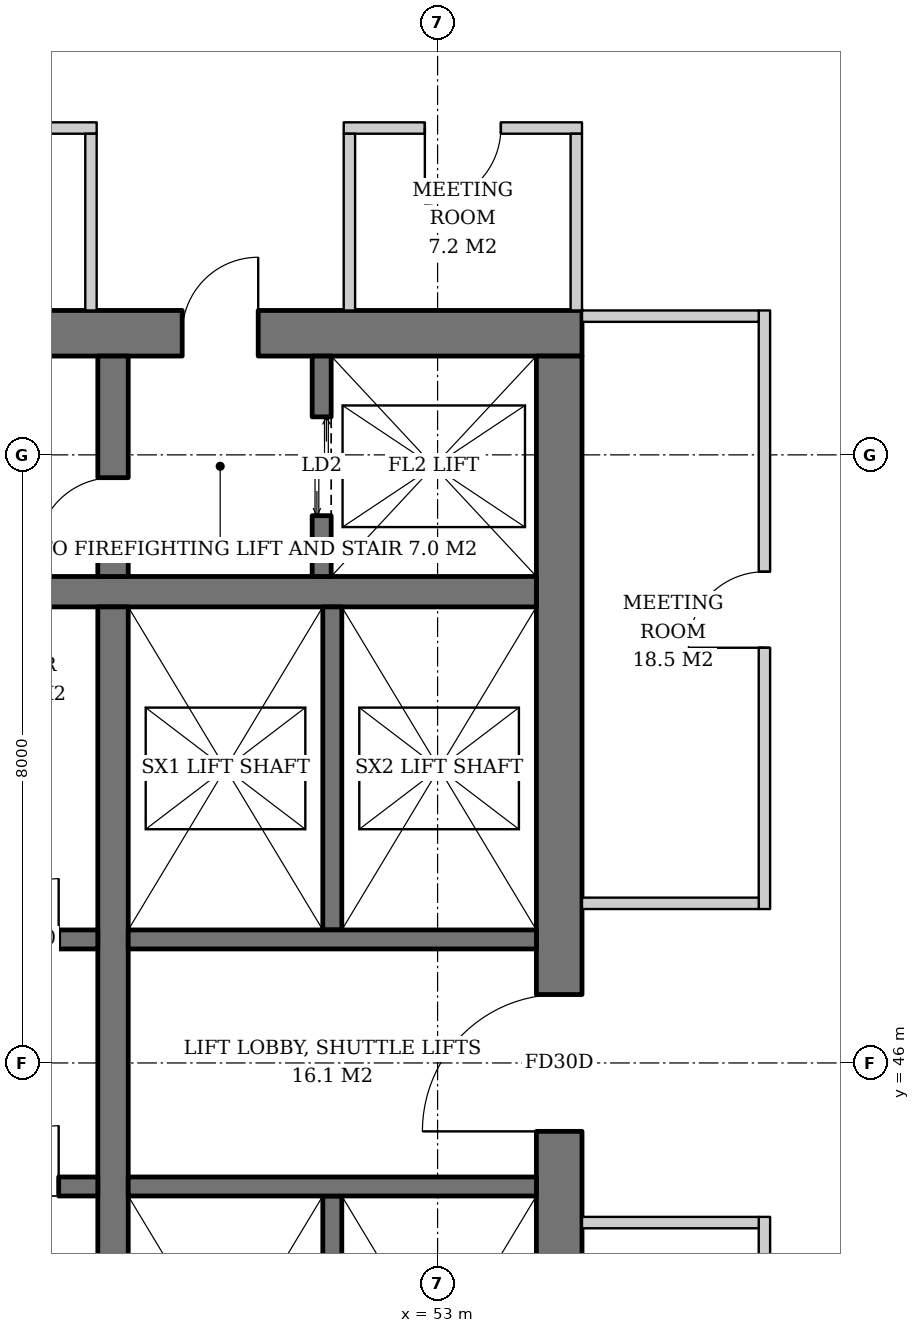
"""IFC4 building model, lengths in metres.
Left out: names, types, materials, properties, quantities, classifications, styles, units other than length and angle.
Written with IfcOpenShell. Run it as: python <this file> out.ifc"""

import sys

from ifc_helpers import new_model, si_unit, direction, frame, frame_2d, origin, place, context, subcontext, project, spatial, rectangle, extrude, element, fill, save


model = new_model("IFC4")
c1 = context("Model", 3, precision=1e-05, world=origin(), true_north=direction((0.0, 1.0)))
c2 = subcontext(c1, "Body", "Model", "MODEL_VIEW")
j1 = project(units=[si_unit("LENGTHUNIT", "METRE"), si_unit("PLANEANGLEUNIT", "RADIAN")], contexts=[c1])
p1 = place(None, origin())
s1 = spatial("IfcSite", under=j1, at=p1, CompositionType="ELEMENT")
p2 = place(p1, origin())
s2 = spatial("IfcBuilding", under=s1, at=p2, CompositionType="ELEMENT")
p3 = place(p2, frame((0.0, 0.0, 176.8)))
s3 = spatial("IfcBuildingStorey", under=s2, at=p3, CompositionType="ELEMENT", Elevation=176.8)
p4 = place(p3, frame((35.1, 55.6, 0.0), z_axis=(0.0, 0.0, 1.0), x_axis=(1.0, 0.0, 0.0)))
e1 = element("IfcWall", 1, at=p4, inside=s3, PredefinedType="SHEAR", context=c2, shape_type="SweptSolid", body=[
    extrude(rectangle(XDim=19.8, YDim=0.6, at=frame_2d((9.9, 0.0))), origin(), (0.0, 0.0, 1.0), 3.8),
])
p5 = place(p4, frame((14.54, 0.0, 0.0)))
e2 = element("IfcOpeningElement", 2, at=p5, cuts=e1, PredefinedType="OPENING", context=c2, shape_type="SweptSolid", body=[
    extrude(rectangle(XDim=1.0, YDim=2.1, at=frame_2d((0.5, 1.05))), frame((0.0, 0.31, 0.0), z_axis=(0.0, -1.0, 0.0), x_axis=(1.0, 0.0, 0.0)), (0.0, 0.0, 1.0), 0.62),
])
p6 = place(p4, frame((1.024, 0.0, 0.0)))
e3 = element("IfcOpeningElement", 3, at=p6, cuts=e1, PredefinedType="OPENING", context=c2, shape_type="SweptSolid", body=[
    extrude(rectangle(XDim=1.0, YDim=2.1, at=frame_2d((0.5, 1.05))), frame((0.0, 0.31, 0.0), z_axis=(0.0, -1.0, 0.0), x_axis=(1.0, 0.0, 0.0)), (0.0, 0.0, 1.0), 0.62),
])
p7 = place(p4, frame((3.262, 0.0, 0.0)))
e4 = element("IfcOpeningElement", 4, at=p7, cuts=e1, PredefinedType="OPENING", context=c2, shape_type="SweptSolid", body=[
    extrude(rectangle(XDim=1.0, YDim=2.1, at=frame_2d((0.5, 1.05))), frame((0.0, 0.31, 0.0), z_axis=(0.0, -1.0, 0.0), x_axis=(1.0, 0.0, 0.0)), (0.0, 0.0, 1.0), 0.62),
])
p8 = place(p3, frame((54.6, 36.7, 0.0), z_axis=(0.0, 0.0, 1.0), x_axis=(0.0, 1.0, 0.0)))
e5 = element("IfcWall", 5, at=p8, inside=s3, PredefinedType="SHEAR", context=c2, shape_type="SweptSolid", body=[
    extrude(rectangle(XDim=18.6, YDim=0.6, at=frame_2d((9.3, 0.0))), origin(), (0.0, 0.0, 1.0), 3.8),
])
p9 = place(p8, frame((8.4, 0.0, 0.0)))
e6 = element("IfcOpeningElement", 6, at=p9, cuts=e5, PredefinedType="OPENING", context=c2, shape_type="SweptSolid", body=[
    extrude(rectangle(XDim=1.8, YDim=2.4, at=frame_2d((0.9, 1.2))), frame((0.0, 0.31, 0.0), z_axis=(0.0, -1.0, 0.0), x_axis=(1.0, 0.0, 0.0)), (0.0, 0.0, 1.0), 0.62),
])
p10 = place(p3, frame((35.7, 52.2, 0.0), z_axis=(0.0, 0.0, 1.0), x_axis=(1.0, 0.0, 0.0)))
e7 = element("IfcWall", 7, at=p10, inside=s3, PredefinedType="SHEAR", context=c2, shape_type="SweptSolid", body=[
    extrude(rectangle(XDim=18.6, YDim=0.4, at=frame_2d((9.3, 0.0))), origin(), (0.0, 0.0, 1.0), 3.8),
])
p11 = place(p3, frame((48.73, 40.0, 0.0), z_axis=(0.0, 0.0, 1.0), x_axis=(0.0, 1.0, 0.0)))
e8 = element("IfcWall", 8, at=p11, inside=s3, PredefinedType="SHEAR", context=c2, shape_type="SweptSolid", body=[
    extrude(rectangle(XDim=12.0, YDim=0.4, at=frame_2d((6.0, 0.0))), origin(), (0.0, 0.0, 1.0), 3.8),
])
p12 = place(p3, frame((48.73, 52.4, 0.0), z_axis=(0.0, 0.0, 1.0), x_axis=(0.0, 1.0, 0.0)))
e9 = element("IfcWall", 9, at=p12, inside=s3, PredefinedType="SHEAR", context=c2, shape_type="SweptSolid", body=[
    extrude(rectangle(XDim=2.9, YDim=0.4, at=frame_2d((1.45, 0.0))), origin(), (0.0, 0.0, 1.0), 3.8),
])
p13 = place(p12, frame((0.3, 0.0, 0.0)))
e10 = element("IfcOpeningElement", 10, at=p13, cuts=e9, PredefinedType="OPENING", context=c2, shape_type="SweptSolid", body=[
    extrude(rectangle(XDim=1.0, YDim=2.1, at=frame_2d((0.5, 1.05))), frame((0.0, 0.21, 0.0), z_axis=(0.0, -1.0, 0.0), x_axis=(1.0, 0.0, 0.0)), (0.0, 0.0, 1.0), 0.42),
])
p14 = place(p3, frame((51.475, 52.4, 0.0), z_axis=(0.0, 0.0, 1.0), x_axis=(0.0, 1.0, 0.0)))
e11 = element("IfcWall", 11, at=p14, inside=s3, PredefinedType="SHEAR", context=c2, shape_type="SweptSolid", body=[
    extrude(rectangle(XDim=2.9, YDim=0.25, at=frame_2d((1.45, 0.0))), origin(), (0.0, 0.0, 1.0), 3.8),
])
p15 = place(p14, frame((0.8, 0.0, 0.0)))
e12 = element("IfcOpeningElement", 12, at=p15, cuts=e11, PredefinedType="OPENING", context=c2, shape_type="SweptSolid", body=[
    extrude(rectangle(XDim=1.3, YDim=2.2, at=frame_2d((0.65, 1.1))), frame((0.0, 0.135, 0.0), z_axis=(0.0, -1.0, 0.0), x_axis=(1.0, 0.0, 0.0)), (0.0, 0.0, 1.0), 0.27),
])
p16 = place(p3, frame((35.7, 47.625, 0.0), z_axis=(0.0, 0.0, 1.0), x_axis=(1.0, 0.0, 0.0)))
e13 = element("IfcWall", 13, at=p16, inside=s3, PredefinedType="SHEAR", context=c2, shape_type="SweptSolid", body=[
    extrude(rectangle(XDim=12.83, YDim=0.25, at=frame_2d((6.415, 0.0))), origin(), (0.0, 0.0, 1.0), 3.8),
])
p17 = place(p16, frame((0.7, 0.0, 0.0)))
e14 = element("IfcOpeningElement", 14, at=p17, cuts=e13, PredefinedType="OPENING", context=c2, shape_type="SweptSolid", body=[
    extrude(rectangle(XDim=1.1, YDim=2.2, at=frame_2d((0.55, 1.1))), frame((0.0, 0.135, 0.0), z_axis=(0.0, -1.0, 0.0), x_axis=(1.0, 0.0, 0.0)), (0.0, 0.0, 1.0), 0.27),
])
p18 = place(p16, frame((3.45, 0.0, 0.0)))
e15 = element("IfcOpeningElement", 15, at=p18, cuts=e13, PredefinedType="OPENING", context=c2, shape_type="SweptSolid", body=[
    extrude(rectangle(XDim=1.1, YDim=2.2, at=frame_2d((0.55, 1.1))), frame((0.0, 0.135, 0.0), z_axis=(0.0, -1.0, 0.0), x_axis=(1.0, 0.0, 0.0)), (0.0, 0.0, 1.0), 0.27),
])
p19 = place(p16, frame((6.2, 0.0, 0.0)))
e16 = element("IfcOpeningElement", 16, at=p19, cuts=e13, PredefinedType="OPENING", context=c2, shape_type="SweptSolid", body=[
    extrude(rectangle(XDim=1.1, YDim=2.2, at=frame_2d((0.55, 1.1))), frame((0.0, 0.135, 0.0), z_axis=(0.0, -1.0, 0.0), x_axis=(1.0, 0.0, 0.0)), (0.0, 0.0, 1.0), 0.27),
])
p20 = place(p16, frame((9.0, 0.0, 0.0)))
e17 = element("IfcOpeningElement", 17, at=p20, cuts=e13, PredefinedType="OPENING", context=c2, shape_type="SweptSolid", body=[
    extrude(rectangle(XDim=1.0, YDim=2.1, at=frame_2d((0.5, 1.05))), frame((0.0, 0.135, 0.0), z_axis=(0.0, -1.0, 0.0), x_axis=(1.0, 0.0, 0.0)), (0.0, 0.0, 1.0), 0.27),
])
p21 = place(p16, frame((11.515, 0.0, 0.0)))
e18 = element("IfcOpeningElement", 18, at=p21, cuts=e13, PredefinedType="OPENING", context=c2, shape_type="SweptSolid", body=[
    extrude(rectangle(XDim=0.8, YDim=2.0, at=frame_2d((0.4, 1.0))), frame((0.0, 0.135, 0.0), z_axis=(0.0, -1.0, 0.0), x_axis=(1.0, 0.0, 0.0)), (0.0, 0.0, 1.0), 0.27),
])
p22 = place(p3, frame((35.7, 44.375, 0.0), z_axis=(0.0, 0.0, 1.0), x_axis=(1.0, 0.0, 0.0)))
e19 = element("IfcWall", 19, at=p22, inside=s3, PredefinedType="SHEAR", context=c2, shape_type="SweptSolid", body=[
    extrude(rectangle(XDim=12.83, YDim=0.25, at=frame_2d((6.415, 0.0))), origin(), (0.0, 0.0, 1.0), 3.8),
])
p23 = place(p22, frame((0.7, 0.0, 0.0)))
e20 = element("IfcOpeningElement", 20, at=p23, cuts=e19, PredefinedType="OPENING", context=c2, shape_type="SweptSolid", body=[
    extrude(rectangle(XDim=1.1, YDim=2.2, at=frame_2d((0.55, 1.1))), frame((0.0, 0.135, 0.0), z_axis=(0.0, -1.0, 0.0), x_axis=(1.0, 0.0, 0.0)), (0.0, 0.0, 1.0), 0.27),
])
p24 = place(p22, frame((3.45, 0.0, 0.0)))
e21 = element("IfcOpeningElement", 21, at=p24, cuts=e19, PredefinedType="OPENING", context=c2, shape_type="SweptSolid", body=[
    extrude(rectangle(XDim=1.1, YDim=2.2, at=frame_2d((0.55, 1.1))), frame((0.0, 0.135, 0.0), z_axis=(0.0, -1.0, 0.0), x_axis=(1.0, 0.0, 0.0)), (0.0, 0.0, 1.0), 0.27),
])
p25 = place(p22, frame((6.2, 0.0, 0.0)))
e22 = element("IfcOpeningElement", 22, at=p25, cuts=e19, PredefinedType="OPENING", context=c2, shape_type="SweptSolid", body=[
    extrude(rectangle(XDim=1.1, YDim=2.2, at=frame_2d((0.55, 1.1))), frame((0.0, 0.135, 0.0), z_axis=(0.0, -1.0, 0.0), x_axis=(1.0, 0.0, 0.0)), (0.0, 0.0, 1.0), 0.27),
])
p26 = place(p22, frame((9.0, 0.0, 0.0)))
e23 = element("IfcOpeningElement", 23, at=p26, cuts=e19, PredefinedType="OPENING", context=c2, shape_type="SweptSolid", body=[
    extrude(rectangle(XDim=1.0, YDim=2.1, at=frame_2d((0.5, 1.05))), frame((0.0, 0.135, 0.0), z_axis=(0.0, -1.0, 0.0), x_axis=(1.0, 0.0, 0.0)), (0.0, 0.0, 1.0), 0.27),
])
p27 = place(p22, frame((11.515, 0.0, 0.0)))
e24 = element("IfcOpeningElement", 24, at=p27, cuts=e19, PredefinedType="OPENING", context=c2, shape_type="SweptSolid", body=[
    extrude(rectangle(XDim=0.8, YDim=2.0, at=frame_2d((0.4, 1.0))), frame((0.0, 0.135, 0.0), z_axis=(0.0, -1.0, 0.0), x_axis=(1.0, 0.0, 0.0)), (0.0, 0.0, 1.0), 0.27),
])
p28 = place(p3, frame((51.615, 47.75, 0.0), z_axis=(0.0, 0.0, 1.0), x_axis=(0.0, 1.0, 0.0)))
e25 = element("IfcWall", 25, at=p28, inside=s3, PredefinedType="SHEAR", context=c2, shape_type="SweptSolid", body=[
    extrude(rectangle(XDim=4.25, YDim=0.25, at=frame_2d((2.125, 0.0))), origin(), (0.0, 0.0, 1.0), 3.8),
])
p29 = place(p3, frame((48.93, 47.625, 0.0), z_axis=(0.0, 0.0, 1.0), x_axis=(1.0, 0.0, 0.0)))
e26 = element("IfcWall", 26, at=p29, inside=s3, PredefinedType="SHEAR", context=c2, shape_type="SweptSolid", body=[
    extrude(rectangle(XDim=5.37, YDim=0.25, at=frame_2d((2.685, 0.0))), origin(), (0.0, 0.0, 1.0), 3.8),
])
p30 = place(p3, frame((51.615, 44.25, 0.0), z_axis=(0.0, 0.0, 1.0), x_axis=(0.0, -1.0, 0.0)))
e27 = element("IfcWall", 27, at=p30, inside=s3, PredefinedType="SHEAR", context=c2, shape_type="SweptSolid", body=[
    extrude(rectangle(XDim=4.25, YDim=0.25, at=frame_2d((2.125, 0.0))), origin(), (0.0, 0.0, 1.0), 3.8),
])
p31 = place(p3, frame((48.93, 44.375, 0.0), z_axis=(0.0, 0.0, 1.0), x_axis=(1.0, 0.0, 0.0)))
e28 = element("IfcWall", 28, at=p31, inside=s3, PredefinedType="SHEAR", context=c2, shape_type="SweptSolid", body=[
    extrude(rectangle(XDim=5.37, YDim=0.25, at=frame_2d((2.685, 0.0))), origin(), (0.0, 0.0, 1.0), 3.8),
])
p32 = place(p3, frame((57.3, 36.1, 0.0), z_axis=(0.0, 0.0, 1.0), x_axis=(0.0, 1.0, 0.0)))
e29 = element("IfcWall", 29, at=p32, inside=s3, PredefinedType="PARTITIONING", context=c2, shape_type="SweptSolid", body=[
    extrude(rectangle(XDim=7.875, YDim=0.15, at=frame_2d((3.938, 0.0))), origin(), (0.0, 0.0, 1.0), 2.867),
])
p33 = place(p32, frame((3.438, 0.0, 0.0)))
e30 = element("IfcOpeningElement", 30, at=p33, cuts=e29, PredefinedType="OPENING", context=c2, shape_type="SweptSolid", body=[
    extrude(rectangle(XDim=1.0, YDim=2.1, at=frame_2d((0.5, 1.05))), frame((0.0, 0.085, 0.0), z_axis=(0.0, -1.0, 0.0), x_axis=(1.0, 0.0, 0.0)), (0.0, 0.0, 1.0), 0.17),
])
p34 = place(p3, frame((54.9, 43.9, 0.0), z_axis=(0.0, 0.0, 1.0), x_axis=(1.0, 0.0, 0.0)))
e31 = element("IfcWall", 31, at=p34, inside=s3, PredefinedType="PARTITIONING", context=c2, shape_type="SweptSolid", body=[
    extrude(rectangle(XDim=2.325, YDim=0.15, at=frame_2d((1.163, 0.0))), origin(), (0.0, 0.0, 1.0), 3.62),
])
p35 = place(p3, frame((57.3, 48.025, 0.0), z_axis=(0.0, 0.0, 1.0), x_axis=(0.0, 1.0, 0.0)))
e32 = element("IfcWall", 32, at=p35, inside=s3, PredefinedType="PARTITIONING", context=c2, shape_type="SweptSolid", body=[
    extrude(rectangle(XDim=7.875, YDim=0.15, at=frame_2d((3.938, 0.0))), origin(), (0.0, 0.0, 1.0), 2.867),
])
p36 = place(p35, frame((3.438, 0.0, 0.0)))
e33 = element("IfcOpeningElement", 33, at=p36, cuts=e32, PredefinedType="OPENING", context=c2, shape_type="SweptSolid", body=[
    extrude(rectangle(XDim=1.0, YDim=2.1, at=frame_2d((0.5, 1.05))), frame((0.0, 0.085, 0.0), z_axis=(0.0, -1.0, 0.0), x_axis=(1.0, 0.0, 0.0)), (0.0, 0.0, 1.0), 0.17),
])
for number, where, z_axis, x_axis in (
    (34, (54.9, 48.1, 0.0), (0.0, 0.0, 1.0), (1.0, 0.0, 0.0)),
    (35, (54.9, 55.825, 0.0), (0.0, 0.0, 1.0), (1.0, 0.0, 0.0)),
):
    element("IfcWall", number, at=place(p3, frame(where, z_axis=z_axis, x_axis=x_axis)), inside=s3, PredefinedType="PARTITIONING", context=c2, shape_type="SweptSolid", body=[
        extrude(rectangle(XDim=2.325, YDim=0.15, at=frame_2d((1.163, 0.0))), origin(), (0.0, 0.0, 1.0), 3.62),
    ])
p37 = place(p3, frame((54.9, 58.3, 0.0), z_axis=(0.0, 0.0, 1.0), x_axis=(-1.0, 0.0, 0.0)))
e36 = element("IfcWall", 36, at=p37, inside=s3, PredefinedType="PARTITIONING", context=c2, shape_type="SweptSolid", body=[
    extrude(rectangle(XDim=3.135, YDim=0.15, at=frame_2d((1.567, 0.0))), origin(), (0.0, 0.0, 1.0), 2.92),
])
p38 = place(p37, frame((1.067, 0.0, 0.0)))
e37 = element("IfcOpeningElement", 37, at=p38, cuts=e36, PredefinedType="OPENING", context=c2, shape_type="SweptSolid", body=[
    extrude(rectangle(XDim=1.0, YDim=2.1, at=frame_2d((0.5, 1.05))), frame((0.0, 0.085, 0.0), z_axis=(0.0, -1.0, 0.0), x_axis=(1.0, 0.0, 0.0)), (0.0, 0.0, 1.0), 0.17),
])
p39 = place(p3, frame((54.825, 55.9, 0.0), z_axis=(0.0, 0.0, 1.0), x_axis=(0.0, 1.0, 0.0)))
e38 = element("IfcWall", 38, at=p39, inside=s3, PredefinedType="PARTITIONING", context=c2, shape_type="SweptSolid", body=[
    extrude(rectangle(XDim=2.325, YDim=0.15, at=frame_2d((1.163, 0.0))), origin(), (0.0, 0.0, 1.0), 2.867),
])
p40 = place(p3, frame((51.84, 55.9, 0.0), z_axis=(0.0, 0.0, 1.0), x_axis=(0.0, 1.0, 0.0)))
e39 = element("IfcWall", 39, at=p40, inside=s3, PredefinedType="PARTITIONING", context=c2, shape_type="SweptSolid", body=[
    extrude(rectangle(XDim=2.325, YDim=0.15, at=frame_2d((1.163, 0.0))), origin(), (0.0, 0.0, 1.0), 3.62),
])
p41 = place(p3, frame((48.515, 58.3, 0.0), z_axis=(0.0, 0.0, 1.0), x_axis=(-1.0, 0.0, 0.0)))
e40 = element("IfcWall", 40, at=p41, inside=s3, PredefinedType="PARTITIONING", context=c2, shape_type="SweptSolid", body=[
    extrude(rectangle(XDim=8.028, YDim=0.15, at=frame_2d((4.014, 0.0))), origin(), (0.0, 0.0, 1.0), 2.867),
])
p42 = place(p41, frame((3.514, 0.0, 0.0)))
e41 = element("IfcOpeningElement", 41, at=p42, cuts=e40, PredefinedType="OPENING", context=c2, shape_type="SweptSolid", body=[
    extrude(rectangle(XDim=1.0, YDim=2.1, at=frame_2d((0.5, 1.05))), frame((0.0, 0.085, 0.0), z_axis=(0.0, -1.0, 0.0), x_axis=(1.0, 0.0, 0.0)), (0.0, 0.0, 1.0), 0.17),
])
p43 = place(p3, frame((48.44, 55.9, 0.0), z_axis=(0.0, 0.0, 1.0), x_axis=(0.0, 1.0, 0.0)))
e42 = element("IfcWall", 42, at=p43, inside=s3, PredefinedType="PARTITIONING", context=c2, shape_type="SweptSolid", body=[
    extrude(rectangle(XDim=2.325, YDim=0.15, at=frame_2d((1.163, 0.0))), origin(), (0.0, 0.0, 1.0), 3.62),
])
p44 = place(p15, origin())
e43 = element("IfcDoor", 43, at=p44, inside=s3, OperationType="DOUBLE_DOOR_SLIDING", PredefinedType="DOOR", context=c2, shape_type="SweptSolid", body=[
    extrude(rectangle(XDim=1.3, YDim=2.2, at=frame_2d((0.65, 1.1))), frame((0.0, 0.025, 0.0), z_axis=(0.0, -1.0, 0.0), x_axis=(1.0, 0.0, 0.0)), (0.0, 0.0, 1.0), 0.05),
])
fill(e12, e43)
p45 = place(p21, origin())
e44 = element("IfcDoor", 44, at=p45, inside=s3, OperationType="SINGLE_SWING_RIGHT", PredefinedType="DOOR", context=c2, shape_type="SweptSolid", body=[
    extrude(rectangle(XDim=0.8, YDim=2.0, at=frame_2d((0.4, 1.0))), frame((0.0, 0.025, 0.0), z_axis=(0.0, -1.0, 0.0), x_axis=(1.0, 0.0, 0.0)), (0.0, 0.0, 1.0), 0.05),
])
fill(e18, e44)
p46 = place(p27, origin())
e45 = element("IfcDoor", 45, at=p46, inside=s3, OperationType="SINGLE_SWING_RIGHT", PredefinedType="DOOR", context=c2, shape_type="SweptSolid", body=[
    extrude(rectangle(XDim=0.8, YDim=2.0, at=frame_2d((0.4, 1.0))), frame((0.0, 0.025, 0.0), z_axis=(0.0, -1.0, 0.0), x_axis=(1.0, 0.0, 0.0)), (0.0, 0.0, 1.0), 0.05),
])
fill(e24, e45)
p47 = place(p13, origin())
e46 = element("IfcDoor", 46, at=p47, inside=s3, OperationType="SINGLE_SWING_LEFT", PredefinedType="DOOR", context=c2, shape_type="SweptSolid", body=[
    extrude(rectangle(XDim=1.0, YDim=2.1, at=frame_2d((0.5, 1.05))), frame((0.0, 0.025, 0.0), z_axis=(0.0, -1.0, 0.0), x_axis=(1.0, 0.0, 0.0)), (0.0, 0.0, 1.0), 0.05),
])
fill(e10, e46)
p48 = place(p5, origin())
e47 = element("IfcDoor", 47, at=p48, inside=s3, OperationType="SINGLE_SWING_RIGHT", PredefinedType="DOOR", context=c2, shape_type="SweptSolid", body=[
    extrude(rectangle(XDim=1.0, YDim=2.1, at=frame_2d((0.5, 1.05))), frame((0.0, 0.025, 0.0), z_axis=(0.0, -1.0, 0.0), x_axis=(1.0, 0.0, 0.0)), (0.0, 0.0, 1.0), 0.05),
])
fill(e2, e47)
p49 = place(p9, origin())
e48 = element("IfcDoor", 48, at=p49, inside=s3, OperationType="DOUBLE_DOOR_SINGLE_SWING", PredefinedType="DOOR", context=c2, shape_type="SweptSolid", body=[
    extrude(rectangle(XDim=1.8, YDim=2.4, at=frame_2d((0.9, 1.2))), frame((0.0, 0.025, 0.0), z_axis=(0.0, -1.0, 0.0), x_axis=(1.0, 0.0, 0.0)), (0.0, 0.0, 1.0), 0.05),
])
fill(e6, e48)
p50 = place(p36, origin())
e49 = element("IfcDoor", 49, at=p50, inside=s3, OperationType="SINGLE_SWING_LEFT", PredefinedType="DOOR", context=c2, shape_type="SweptSolid", body=[
    extrude(rectangle(XDim=1.0, YDim=2.1, at=frame_2d((0.5, 1.05))), frame((0.0, 0.025, 0.0), z_axis=(0.0, -1.0, 0.0), x_axis=(1.0, 0.0, 0.0)), (0.0, 0.0, 1.0), 0.05),
])
fill(e33, e49)
p51 = place(p38, origin())
e50 = element("IfcDoor", 50, at=p51, inside=s3, OperationType="SINGLE_SWING_RIGHT", PredefinedType="DOOR", context=c2, shape_type="SweptSolid", body=[
    extrude(rectangle(XDim=1.0, YDim=2.1, at=frame_2d((0.5, 1.05))), frame((0.0, 0.025, 0.0), z_axis=(0.0, -1.0, 0.0), x_axis=(1.0, 0.0, 0.0)), (0.0, 0.0, 1.0), 0.05),
])
fill(e37, e50)
save(model, sys.argv[1])
